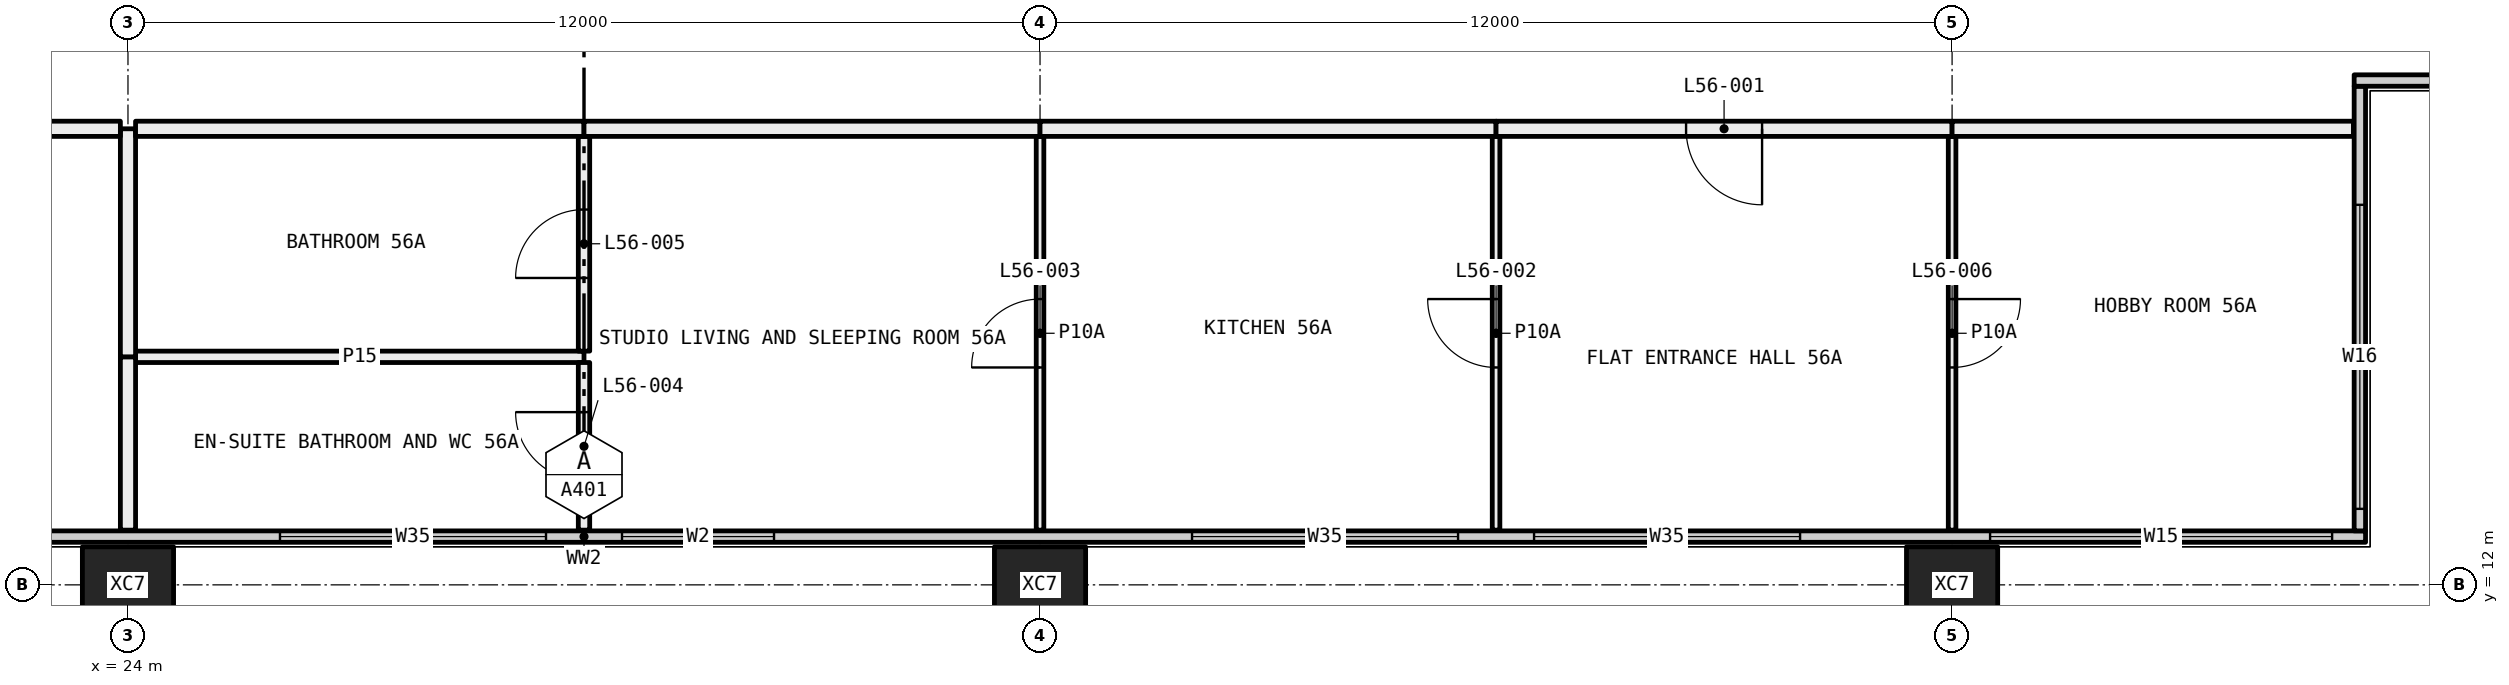
"""IFC4 building model, lengths in metres.
Left out: names, types, materials, properties, quantities, classifications, styles, units other than length and angle.
Written with IfcOpenShell. Run it as: python <this file> out.ifc"""

import sys

from ifc_helpers import new_model, si_unit, direction, frame, frame_2d, origin, origin_2d, place, context, subcontext, project, spatial, rectangle, hollow_rectangle, extrude, element, fill, save


model = new_model("IFC4")
c1 = context("Model", 3, precision=1e-05, world=origin(), true_north=direction((0.0, 1.0)))
c2 = subcontext(c1, "Body", "Model", "MODEL_VIEW")
j1 = project(units=[si_unit("LENGTHUNIT", "METRE"), si_unit("PLANEANGLEUNIT", "RADIAN")], contexts=[c1])
p1 = place(None, origin())
s1 = spatial("IfcSite", under=j1, at=p1, CompositionType="ELEMENT")
p2 = place(p1, origin())
s2 = spatial("IfcBuilding", under=s1, at=p2, CompositionType="ELEMENT")
p3 = place(p2, frame((0.0, 0.0, 210.0)))
s3 = spatial("IfcBuildingStorey", under=s2, at=p3, CompositionType="ELEMENT", Elevation=210.0)
for number, where, z_axis, x_axis in (
    (1, (24.0, 12.0, -0.4), (0.0, 0.0, 1.0), (1.0, 0.0, 0.0)),
    (2, (36.0, 12.0, -0.4), (0.0, 0.0, 1.0), (1.0, 0.0, 0.0)),
    (3, (48.0, 12.0, -0.4), (0.0, 0.0, 1.0), (1.0, 0.0, 0.0)),
):
    element("IfcColumn", number, at=place(p3, frame(where, z_axis=z_axis, x_axis=x_axis)), inside=s3, PredefinedType="COLUMN", context=c2, shape_type="SweptSolid", body=[
        extrude(hollow_rectangle(XDim=1.2, YDim=1.0, WallThickness=0.045, at=origin_2d()), origin(), (0.0, 0.0, 1.0), 3.45),
    ])
p4 = place(p3, frame((6.56, 12.635, 0.0), z_axis=(0.0, 0.0, 1.0), x_axis=(1.0, 0.0, 0.0)))
e4 = element("IfcWall", 4, at=p4, inside=s3, PredefinedType="ELEMENTEDWALL", context=c2, shape_type="SweptSolid", body=[
    extrude(rectangle(XDim=46.88, YDim=0.15, at=frame_2d((23.44, 0.0))), origin(), (0.0, 0.0, 1.0), 3.05),
])
p5 = place(p4, frame((0.44, 0.0, 0.45)))
e5 = element("IfcOpeningElement", 5, at=p5, cuts=e4, PredefinedType="OPENING", context=c2, shape_type="SweptSolid", body=[
    extrude(rectangle(XDim=4.5, YDim=2.55, at=frame_2d((2.25, 1.275))), frame((0.0, 0.085, 0.0), z_axis=(0.0, -1.0, 0.0), x_axis=(1.0, 0.0, 0.0)), (0.0, 0.0, 1.0), 0.17),
])
p6 = place(p4, frame((7.44, 0.0, 0.45)))
e6 = element("IfcOpeningElement", 6, at=p6, cuts=e4, PredefinedType="OPENING", context=c2, shape_type="SweptSolid", body=[
    extrude(rectangle(XDim=3.5, YDim=2.55, at=frame_2d((1.75, 1.275))), frame((0.0, 0.085, 0.0), z_axis=(0.0, -1.0, 0.0), x_axis=(1.0, 0.0, 0.0)), (0.0, 0.0, 1.0), 0.17),
])
p7 = place(p4, frame((11.94, 0.0, 0.45)))
e7 = element("IfcOpeningElement", 7, at=p7, cuts=e4, PredefinedType="OPENING", context=c2, shape_type="SweptSolid", body=[
    extrude(rectangle(XDim=3.5, YDim=2.55, at=frame_2d((1.75, 1.275))), frame((0.0, 0.085, 0.0), z_axis=(0.0, -1.0, 0.0), x_axis=(1.0, 0.0, 0.0)), (0.0, 0.0, 1.0), 0.17),
])
p8 = place(p4, frame((19.44, 0.0, 0.45)))
e8 = element("IfcOpeningElement", 8, at=p8, cuts=e4, PredefinedType="OPENING", context=c2, shape_type="SweptSolid", body=[
    extrude(rectangle(XDim=3.5, YDim=2.55, at=frame_2d((1.75, 1.275))), frame((0.0, 0.085, 0.0), z_axis=(0.0, -1.0, 0.0), x_axis=(1.0, 0.0, 0.0)), (0.0, 0.0, 1.0), 0.17),
])
p9 = place(p4, frame((23.94, 0.0, 0.45)))
e9 = element("IfcOpeningElement", 9, at=p9, cuts=e4, PredefinedType="OPENING", context=c2, shape_type="SweptSolid", body=[
    extrude(rectangle(XDim=2.0, YDim=2.55, at=frame_2d((1.0, 1.275))), frame((0.0, 0.085, 0.0), z_axis=(0.0, -1.0, 0.0), x_axis=(1.0, 0.0, 0.0)), (0.0, 0.0, 1.0), 0.17),
])
p10 = place(p4, frame((31.44, 0.0, 0.45)))
e10 = element("IfcOpeningElement", 10, at=p10, cuts=e4, PredefinedType="OPENING", context=c2, shape_type="SweptSolid", body=[
    extrude(rectangle(XDim=3.5, YDim=2.55, at=frame_2d((1.75, 1.275))), frame((0.0, 0.085, 0.0), z_axis=(0.0, -1.0, 0.0), x_axis=(1.0, 0.0, 0.0)), (0.0, 0.0, 1.0), 0.17),
])
p11 = place(p4, frame((35.94, 0.0, 0.45)))
e11 = element("IfcOpeningElement", 11, at=p11, cuts=e4, PredefinedType="OPENING", context=c2, shape_type="SweptSolid", body=[
    extrude(rectangle(XDim=3.5, YDim=2.55, at=frame_2d((1.75, 1.275))), frame((0.0, 0.085, 0.0), z_axis=(0.0, -1.0, 0.0), x_axis=(1.0, 0.0, 0.0)), (0.0, 0.0, 1.0), 0.17),
])
p12 = place(p4, frame((41.94, 0.0, 0.45)))
e12 = element("IfcOpeningElement", 12, at=p12, cuts=e4, PredefinedType="OPENING", context=c2, shape_type="SweptSolid", body=[
    extrude(rectangle(XDim=4.5, YDim=2.55, at=frame_2d((2.25, 1.275))), frame((0.0, 0.085, 0.0), z_axis=(0.0, -1.0, 0.0), x_axis=(1.0, 0.0, 0.0)), (0.0, 0.0, 1.0), 0.17),
])
p13 = place(p3, frame((53.365, 12.71, 0.0), z_axis=(0.0, 0.0, 1.0), x_axis=(0.0, 1.0, 0.0)))
e13 = element("IfcWall", 13, at=p13, inside=s3, PredefinedType="ELEMENTEDWALL", context=c2, shape_type="SweptSolid", body=[
    extrude(rectangle(XDim=5.85, YDim=0.15, at=frame_2d((2.925, 0.0))), origin(), (0.0, 0.0, 1.0), 3.05),
])
p14 = place(p13, frame((0.29, 0.0, 0.45)))
e14 = element("IfcOpeningElement", 14, at=p14, cuts=e13, PredefinedType="OPENING", context=c2, shape_type="SweptSolid", body=[
    extrude(rectangle(XDim=4.0, YDim=2.55, at=frame_2d((2.0, 1.275))), frame((0.0, 0.085, 0.0), z_axis=(0.0, -1.0, 0.0), x_axis=(1.0, 0.0, 0.0)), (0.0, 0.0, 1.0), 0.17),
])
p15 = place(p3, frame((53.29, 18.635, 0.0), z_axis=(0.0, 0.0, 1.0), x_axis=(1.0, 0.0, 0.0)))
e15 = element("IfcWall", 15, at=p15, inside=s3, PredefinedType="ELEMENTEDWALL", context=c2, shape_type="SweptSolid", body=[
    extrude(rectangle(XDim=6.15, YDim=0.15, at=frame_2d((3.075, 0.0))), origin(), (0.0, 0.0, 1.0), 3.05),
])
p16 = place(p15, frame((1.71, 0.0, 0.45)))
e16 = element("IfcOpeningElement", 16, at=p16, cuts=e15, PredefinedType="OPENING", context=c2, shape_type="SweptSolid", body=[
    extrude(rectangle(XDim=4.0, YDim=2.55, at=frame_2d((2.0, 1.275))), frame((0.0, 0.085, 0.0), z_axis=(0.0, -1.0, 0.0), x_axis=(1.0, 0.0, 0.0)), (0.0, 0.0, 1.0), 0.17),
])
p17 = place(p3, frame((30.0, 15.0, 0.0), z_axis=(0.0, 0.0, 1.0), x_axis=(-1.0, 0.0, 0.0)))
e17 = element("IfcWall", 17, at=p17, inside=s3, PredefinedType="PARTITIONING", context=c2, shape_type="SweptSolid", body=[
    extrude(rectangle(XDim=5.9, YDim=0.15, at=frame_2d((2.95, 0.0))), origin(), (0.0, 0.0, 1.0), 3.05),
])
p18 = place(p3, frame((30.0, 12.72, 0.0), z_axis=(0.0, 0.0, 1.0), x_axis=(0.0, 1.0, 0.0)))
e18 = element("IfcWall", 18, at=p18, inside=s3, PredefinedType="PARTITIONING", context=c2, shape_type="SweptSolid", body=[
    extrude(rectangle(XDim=2.205, YDim=0.15, at=frame_2d((1.103, 0.0))), origin(), (0.0, 0.0, 1.0), 3.05),
])
p19 = place(p18, frame((0.653, 0.0, 0.0)))
e19 = element("IfcOpeningElement", 19, at=p19, cuts=e18, PredefinedType="OPENING", context=c2, shape_type="SweptSolid", body=[
    extrude(rectangle(XDim=0.9, YDim=2.1, at=frame_2d((0.45, 1.05))), frame((0.0, 0.085, 0.0), z_axis=(0.0, -1.0, 0.0), x_axis=(1.0, 0.0, 0.0)), (0.0, 0.0, 1.0), 0.17),
])
p20 = place(p3, frame((24.0, 15.0, 0.0), z_axis=(0.0, 0.0, 1.0), x_axis=(0.0, -1.0, 0.0)))
e20 = element("IfcWall", 20, at=p20, inside=s3, PredefinedType="PARTITIONING", context=c2, shape_type="SweptSolid", body=[
    extrude(rectangle(XDim=2.28, YDim=0.2, at=frame_2d((1.14, 0.0))), origin(), (0.0, 0.0, 1.0), 3.05),
])
p21 = place(p3, frame((30.0, 15.075, 0.0), z_axis=(0.0, 0.0, 1.0), x_axis=(0.0, 1.0, 0.0)))
e21 = element("IfcWall", 21, at=p21, inside=s3, PredefinedType="PARTITIONING", context=c2, shape_type="SweptSolid", body=[
    extrude(rectangle(XDim=2.825, YDim=0.15, at=frame_2d((1.413, 0.0))), origin(), (0.0, 0.0, 1.0), 3.05),
])
p22 = place(p21, frame((0.962, 0.0, 0.0)))
e22 = element("IfcOpeningElement", 22, at=p22, cuts=e21, PredefinedType="OPENING", context=c2, shape_type="SweptSolid", body=[
    extrude(rectangle(XDim=0.9, YDim=2.1, at=frame_2d((0.45, 1.05))), frame((0.0, 0.085, 0.0), z_axis=(0.0, -1.0, 0.0), x_axis=(1.0, 0.0, 0.0)), (0.0, 0.0, 1.0), 0.17),
])
p23 = place(p3, frame((24.0, 18.0, 0.0), z_axis=(0.0, 0.0, 1.0), x_axis=(0.0, -1.0, 0.0)))
e23 = element("IfcWall", 23, at=p23, inside=s3, PredefinedType="PARTITIONING", context=c2, shape_type="SweptSolid", body=[
    extrude(rectangle(XDim=3.0, YDim=0.2, at=frame_2d((1.5, 0.0))), origin(), (0.0, 0.0, 1.0), 3.05),
])
p24 = place(p3, frame((30.0, 18.0, 0.0), z_axis=(0.0, 0.0, 1.0), x_axis=(-1.0, 0.0, 0.0)))
e24 = element("IfcWall", 24, at=p24, inside=s3, PredefinedType="PARTITIONING", context=c2, shape_type="SweptSolid", body=[
    extrude(rectangle(XDim=5.9, YDim=0.2, at=frame_2d((2.95, 0.0))), origin(), (0.0, 0.0, 1.0), 3.05),
])
p25 = place(p3, frame((36.0, 12.72, 0.0), z_axis=(0.0, 0.0, 1.0), x_axis=(0.0, 1.0, 0.0)))
e25 = element("IfcWall", 25, at=p25, inside=s3, PredefinedType="PARTITIONING", context=c2, shape_type="SweptSolid", body=[
    extrude(rectangle(XDim=5.18, YDim=0.1, at=frame_2d((2.59, 0.0))), origin(), (0.0, 0.0, 1.0), 2.45),
])
p26 = place(p25, frame((2.14, 0.0, 0.0)))
e26 = element("IfcOpeningElement", 26, at=p26, cuts=e25, PredefinedType="OPENING", context=c2, shape_type="SweptSolid", body=[
    extrude(rectangle(XDim=0.9, YDim=2.1, at=frame_2d((0.45, 1.05))), frame((0.0, 0.06, 0.0), z_axis=(0.0, -1.0, 0.0), x_axis=(1.0, 0.0, 0.0)), (0.0, 0.0, 1.0), 0.12),
])
p27 = place(p3, frame((36.0, 18.0, 0.0), z_axis=(0.0, 0.0, 1.0), x_axis=(-1.0, 0.0, 0.0)))
e27 = element("IfcWall", 27, at=p27, inside=s3, PredefinedType="PARTITIONING", context=c2, shape_type="SweptSolid", body=[
    extrude(rectangle(XDim=6.0, YDim=0.2, at=frame_2d((3.0, 0.0))), origin(), (0.0, 0.0, 1.0), 2.45),
])
p28 = place(p3, frame((42.0, 12.72, 0.0), z_axis=(0.0, 0.0, 1.0), x_axis=(0.0, 1.0, 0.0)))
e28 = element("IfcWall", 28, at=p28, inside=s3, PredefinedType="PARTITIONING", context=c2, shape_type="SweptSolid", body=[
    extrude(rectangle(XDim=5.18, YDim=0.1, at=frame_2d((2.59, 0.0))), origin(), (0.0, 0.0, 1.0), 3.05),
])
p29 = place(p28, frame((2.14, 0.0, 0.0)))
e29 = element("IfcOpeningElement", 29, at=p29, cuts=e28, PredefinedType="OPENING", context=c2, shape_type="SweptSolid", body=[
    extrude(rectangle(XDim=0.9, YDim=2.1, at=frame_2d((0.45, 1.05))), frame((0.0, 0.06, 0.0), z_axis=(0.0, -1.0, 0.0), x_axis=(1.0, 0.0, 0.0)), (0.0, 0.0, 1.0), 0.12),
])
p30 = place(p3, frame((42.0, 18.0, 0.0), z_axis=(0.0, 0.0, 1.0), x_axis=(-1.0, 0.0, 0.0)))
e30 = element("IfcWall", 30, at=p30, inside=s3, PredefinedType="PARTITIONING", context=c2, shape_type="SweptSolid", body=[
    extrude(rectangle(XDim=6.0, YDim=0.2, at=frame_2d((3.0, 0.0))), origin(), (0.0, 0.0, 1.0), 2.45),
])
p31 = place(p3, frame((48.0, 12.72, 0.0), z_axis=(0.0, 0.0, 1.0), x_axis=(0.0, 1.0, 0.0)))
e31 = element("IfcWall", 31, at=p31, inside=s3, PredefinedType="PARTITIONING", context=c2, shape_type="SweptSolid", body=[
    extrude(rectangle(XDim=5.18, YDim=0.1, at=frame_2d((2.59, 0.0))), origin(), (0.0, 0.0, 1.0), 3.05),
])
p32 = place(p31, frame((2.14, 0.0, 0.0)))
e32 = element("IfcOpeningElement", 32, at=p32, cuts=e31, PredefinedType="OPENING", context=c2, shape_type="SweptSolid", body=[
    extrude(rectangle(XDim=0.9, YDim=2.1, at=frame_2d((0.45, 1.05))), frame((0.0, 0.06, 0.0), z_axis=(0.0, -1.0, 0.0), x_axis=(1.0, 0.0, 0.0)), (0.0, 0.0, 1.0), 0.12),
])
p33 = place(p3, frame((48.0, 18.0, 0.0), z_axis=(0.0, 0.0, 1.0), x_axis=(-1.0, 0.0, 0.0)))
e33 = element("IfcWall", 33, at=p33, inside=s3, PredefinedType="PARTITIONING", context=c2, shape_type="SweptSolid", body=[
    extrude(rectangle(XDim=6.0, YDim=0.2, at=frame_2d((3.0, 0.0))), origin(), (0.0, 0.0, 1.0), 3.05),
])
p34 = place(p33, frame((2.5, 0.0, 0.0)))
e34 = element("IfcOpeningElement", 34, at=p34, cuts=e33, PredefinedType="OPENING", context=c2, shape_type="SweptSolid", body=[
    extrude(rectangle(XDim=1.0, YDim=2.1, at=frame_2d((0.5, 1.05))), frame((0.0, 0.11, 0.0), z_axis=(0.0, -1.0, 0.0), x_axis=(1.0, 0.0, 0.0)), (0.0, 0.0, 1.0), 0.22),
])
p35 = place(p3, frame((53.28, 18.0, 0.0), z_axis=(0.0, 0.0, 1.0), x_axis=(-1.0, 0.0, 0.0)))
e35 = element("IfcWall", 35, at=p35, inside=s3, PredefinedType="PARTITIONING", context=c2, shape_type="SweptSolid", body=[
    extrude(rectangle(XDim=5.28, YDim=0.2, at=frame_2d((2.64, 0.0))), origin(), (0.0, 0.0, 1.0), 3.05),
])
p36 = place(p3, frame((23.9, 18.0, 0.0), z_axis=(0.0, 0.0, 1.0), x_axis=(-1.0, 0.0, 0.0)))
e36 = element("IfcWall", 36, at=p36, inside=s3, PredefinedType="PARTITIONING", context=c2, shape_type="SweptSolid", body=[
    extrude(rectangle(XDim=13.7, YDim=0.2, at=frame_2d((6.85, 0.0))), origin(), (0.0, 0.0, 1.0), 3.05),
])
p37 = place(p36, frame((6.05, 0.0, 0.0)))
e37 = element("IfcOpeningElement", 37, at=p37, cuts=e36, PredefinedType="OPENING", context=c2, shape_type="SweptSolid", body=[
    extrude(rectangle(XDim=1.6, YDim=2.1, at=frame_2d((0.8, 1.05))), frame((0.0, 0.11, 0.0), z_axis=(0.0, -1.0, 0.0), x_axis=(1.0, 0.0, 0.0)), (0.0, 0.0, 1.0), 0.22),
])
p38 = place(p8, origin())
e38 = element("IfcWindow", 38, at=p38, inside=s3, PartitioningType="SINGLE_PANEL", PredefinedType="WINDOW", context=c2, shape_type="SweptSolid", body=[
    extrude(rectangle(XDim=3.5, YDim=2.55, at=frame_2d((1.75, 1.275))), frame((0.0, 0.03, 0.0), z_axis=(0.0, -1.0, 0.0), x_axis=(1.0, 0.0, 0.0)), (0.0, 0.0, 1.0), 0.06),
])
fill(e8, e38)
p39 = place(p9, origin())
e39 = element("IfcWindow", 39, at=p39, inside=s3, PartitioningType="SINGLE_PANEL", PredefinedType="WINDOW", context=c2, shape_type="SweptSolid", body=[
    extrude(rectangle(XDim=2.0, YDim=2.55, at=frame_2d((1.0, 1.275))), frame((0.0, 0.03, 0.0), z_axis=(0.0, -1.0, 0.0), x_axis=(1.0, 0.0, 0.0)), (0.0, 0.0, 1.0), 0.06),
])
fill(e9, e39)
p40 = place(p10, origin())
e40 = element("IfcWindow", 40, at=p40, inside=s3, PartitioningType="SINGLE_PANEL", PredefinedType="WINDOW", context=c2, shape_type="SweptSolid", body=[
    extrude(rectangle(XDim=3.5, YDim=2.55, at=frame_2d((1.75, 1.275))), frame((0.0, 0.03, 0.0), z_axis=(0.0, -1.0, 0.0), x_axis=(1.0, 0.0, 0.0)), (0.0, 0.0, 1.0), 0.06),
])
fill(e10, e40)
p41 = place(p11, origin())
e41 = element("IfcWindow", 41, at=p41, inside=s3, PartitioningType="SINGLE_PANEL", PredefinedType="WINDOW", context=c2, shape_type="SweptSolid", body=[
    extrude(rectangle(XDim=3.5, YDim=2.55, at=frame_2d((1.75, 1.275))), frame((0.0, 0.03, 0.0), z_axis=(0.0, -1.0, 0.0), x_axis=(1.0, 0.0, 0.0)), (0.0, 0.0, 1.0), 0.06),
])
fill(e11, e41)
p42 = place(p12, origin())
e42 = element("IfcWindow", 42, at=p42, inside=s3, PartitioningType="SINGLE_PANEL", PredefinedType="WINDOW", context=c2, shape_type="SweptSolid", body=[
    extrude(rectangle(XDim=4.5, YDim=2.55, at=frame_2d((2.25, 1.275))), frame((0.0, 0.03, 0.0), z_axis=(0.0, -1.0, 0.0), x_axis=(1.0, 0.0, 0.0)), (0.0, 0.0, 1.0), 0.06),
])
fill(e12, e42)
p43 = place(p14, origin())
e43 = element("IfcWindow", 43, at=p43, inside=s3, PartitioningType="SINGLE_PANEL", PredefinedType="WINDOW", context=c2, shape_type="SweptSolid", body=[
    extrude(rectangle(XDim=4.0, YDim=2.55, at=frame_2d((2.0, 1.275))), frame((0.0, 0.03, 0.0), z_axis=(0.0, -1.0, 0.0), x_axis=(1.0, 0.0, 0.0)), (0.0, 0.0, 1.0), 0.06),
])
fill(e14, e43)
p44 = place(p34, origin())
e44 = element("IfcDoor", 44, at=p44, inside=s3, OperationType="SINGLE_SWING_RIGHT", PredefinedType="DOOR", context=c2, shape_type="SweptSolid", body=[
    extrude(rectangle(XDim=1.0, YDim=2.1, at=frame_2d((0.5, 1.05))), frame((0.0, 0.025, 0.0), z_axis=(0.0, -1.0, 0.0), x_axis=(1.0, 0.0, 0.0)), (0.0, 0.0, 1.0), 0.05),
])
fill(e34, e44)
p45 = place(p29, origin())
e45 = element("IfcDoor", 45, at=p45, inside=s3, OperationType="SINGLE_SWING_LEFT", PredefinedType="DOOR", context=c2, shape_type="SweptSolid", body=[
    extrude(rectangle(XDim=0.9, YDim=2.1, at=frame_2d((0.45, 1.05))), frame((0.0, 0.025, 0.0), z_axis=(0.0, -1.0, 0.0), x_axis=(1.0, 0.0, 0.0)), (0.0, 0.0, 1.0), 0.05),
])
fill(e29, e45)
p46 = place(p26, origin())
e46 = element("IfcDoor", 46, at=p46, inside=s3, OperationType="SINGLE_SWING_RIGHT", PredefinedType="DOOR", context=c2, shape_type="SweptSolid", body=[
    extrude(rectangle(XDim=0.9, YDim=2.1, at=frame_2d((0.45, 1.05))), frame((0.0, 0.025, 0.0), z_axis=(0.0, -1.0, 0.0), x_axis=(1.0, 0.0, 0.0)), (0.0, 0.0, 1.0), 0.05),
])
fill(e26, e46)
p47 = place(p19, origin())
e47 = element("IfcDoor", 47, at=p47, inside=s3, OperationType="SINGLE_SWING_LEFT", PredefinedType="DOOR", context=c2, shape_type="SweptSolid", body=[
    extrude(rectangle(XDim=0.9, YDim=2.1, at=frame_2d((0.45, 1.05))), frame((0.0, 0.025, 0.0), z_axis=(0.0, -1.0, 0.0), x_axis=(1.0, 0.0, 0.0)), (0.0, 0.0, 1.0), 0.05),
])
fill(e19, e47)
p48 = place(p22, origin())
e48 = element("IfcDoor", 48, at=p48, inside=s3, OperationType="SINGLE_SWING_RIGHT", PredefinedType="DOOR", context=c2, shape_type="SweptSolid", body=[
    extrude(rectangle(XDim=0.9, YDim=2.1, at=frame_2d((0.45, 1.05))), frame((0.0, 0.025, 0.0), z_axis=(0.0, -1.0, 0.0), x_axis=(1.0, 0.0, 0.0)), (0.0, 0.0, 1.0), 0.05),
])
fill(e22, e48)
p49 = place(p32, frame((0.9, 0.0, 0.0), x_axis=(-1.0, 0.0, 0.0)))
e49 = element("IfcDoor", 49, at=p49, inside=s3, OperationType="SINGLE_SWING_RIGHT", PredefinedType="DOOR", context=c2, shape_type="SweptSolid", body=[
    extrude(rectangle(XDim=0.9, YDim=2.1, at=frame_2d((0.45, 1.05))), frame((0.0, 0.025, 0.0), z_axis=(0.0, -1.0, 0.0), x_axis=(1.0, 0.0, 0.0)), (0.0, 0.0, 1.0), 0.05),
])
fill(e32, e49)
save(model, sys.argv[1])
